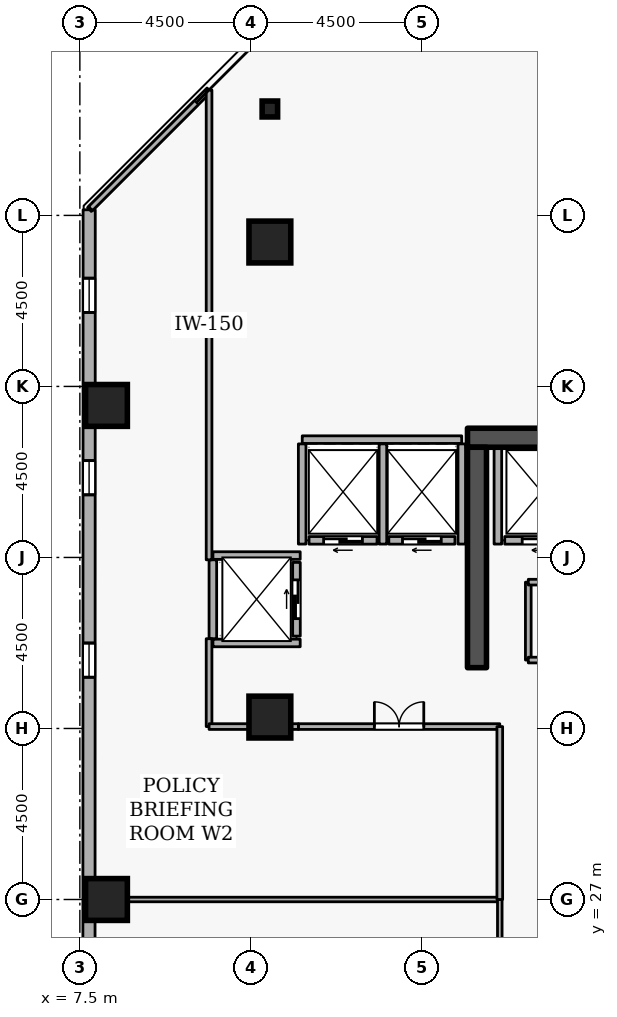
"""IFC4 building model, lengths in metres.
Left out: names, types, materials, properties, quantities, classifications, styles, units other than length and angle.
Written with IfcOpenShell. Run it as: python <this file> out.ifc"""

import sys

from ifc_helpers import new_model, si_unit, direction, frame, frame_2d, origin, origin_2d, place, context, subcontext, project, spatial, rectangle, i_section, extrude, element, fill, save


model = new_model("IFC4")
c1 = context("Model", 3, precision=1e-05, world=origin(), true_north=direction((0.0, 1.0)))
c2 = subcontext(c1, "Body", "Model", "MODEL_VIEW")
j1 = project(units=[si_unit("LENGTHUNIT", "METRE"), si_unit("PLANEANGLEUNIT", "RADIAN")], contexts=[c1])
p1 = place(None, origin())
s1 = spatial("IfcSite", under=j1, at=p1, CompositionType="ELEMENT")
p2 = place(p1, origin())
s2 = spatial("IfcBuilding", under=s1, at=p2, CompositionType="ELEMENT")
p3 = place(p2, frame((0.0, 0.0, 182.1)))
s3 = spatial("IfcBuildingStorey", under=s2, at=p3, CompositionType="ELEMENT", Elevation=182.1)
p4 = place(p3, frame((17.7, 39.15, 0.0), z_axis=(0.0, 0.0, 1.0), x_axis=(1.0, 0.0, 0.0)))
e1 = element("IfcWall", 1, at=p4, inside=s3, PredefinedType="SHEAR", context=c2, shape_type="SweptSolid", body=[
    extrude(rectangle(XDim=15.6, YDim=0.5, at=frame_2d((7.8, 0.0))), origin(), (0.0, 0.0, 1.0), 3.6),
])
p5 = place(p3, frame((17.95, 33.1, 0.0), z_axis=(0.0, 0.0, 1.0), x_axis=(0.0, 1.0, 0.0)))
e2 = element("IfcWall", 2, at=p5, inside=s3, PredefinedType="SHEAR", context=c2, shape_type="SweptSolid", body=[
    extrude(rectangle(XDim=5.8, YDim=0.5, at=frame_2d((2.9, 0.0))), origin(), (0.0, 0.0, 1.0), 3.6),
])
for number, where, z_axis, x_axis in (
    (3, (12.5, 44.3, 0.0), (0.0, 0.0, 1.0), (1.0, 0.0, 0.0)),
    (4, (8.2, 27.0, 0.0), (0.0, 0.0, 1.0), (1.0, 0.0, 0.0)),
    (5, (8.2, 40.0, 0.0), (0.0, 0.0, 1.0), (1.0, 0.0, 0.0)),
    (6, (12.5, 31.8, 0.0), (0.0, 0.0, 1.0), (1.0, 0.0, 0.0)),
):
    element("IfcColumn", number, at=place(p3, frame(where, z_axis=z_axis, x_axis=x_axis)), inside=s3, PredefinedType="COLUMN", context=c2, shape_type="SweptSolid", body=[
        extrude(rectangle(XDim=1.1, YDim=1.1, at=origin_2d()), origin(), (0.0, 0.0, 1.0), 3.6),
    ])
p6 = place(p3, frame((12.5, 47.8, 0.0), z_axis=(0.0, 0.0, 1.0), x_axis=(1.0, 0.0, 0.0)))
e7 = element("IfcColumn", 7, at=p6, inside=s3, PredefinedType="COLUMN", context=c2, shape_type="SweptSolid", body=[
    extrude(i_section(OverallWidth=0.407, OverallDepth=0.419, WebThickness=0.031, FlangeThickness=0.049, FilletRadius=0.015, at=origin_2d()), origin(), (0.0, 0.0, 1.0), 3.6),
])
p7 = place(p3, frame((7.745, 45.148, 0.0), z_axis=(0.0, 0.0, 1.0), x_axis=(-0.000300328883, -0.999999954901, 0.0)))
e8 = element("IfcWall", 8, at=p7, inside=s3, PredefinedType="STANDARD", context=c2, shape_type="SweptSolid", body=[
    extrude(rectangle(XDim=33.329, YDim=0.32, at=frame_2d((16.665, 0.0))), origin(), (0.0, 0.0, 1.0), 2.7),
])
p8 = place(p7, frame((1.8, 0.0, 0.72)))
e9 = element("IfcOpeningElement", 9, at=p8, cuts=e8, PredefinedType="OPENING", context=c2, shape_type="SweptSolid", body=[
    extrude(rectangle(XDim=0.9, YDim=1.75, at=frame_2d((0.45, 0.875))), frame((0.0, 0.17, 0.0), z_axis=(0.0, -1.0, 0.0), x_axis=(1.0, 0.0, 0.0)), (0.0, 0.0, 1.0), 0.34),
])
p9 = place(p7, frame((6.6, 0.0, 0.72)))
e10 = element("IfcOpeningElement", 10, at=p9, cuts=e8, PredefinedType="OPENING", context=c2, shape_type="SweptSolid", body=[
    extrude(rectangle(XDim=0.9, YDim=1.75, at=frame_2d((0.45, 0.875))), frame((0.0, 0.17, 0.0), z_axis=(0.0, -1.0, 0.0), x_axis=(1.0, 0.0, 0.0)), (0.0, 0.0, 1.0), 0.34),
])
p10 = place(p7, frame((11.4, 0.0, 0.72)))
e11 = element("IfcOpeningElement", 11, at=p10, cuts=e8, PredefinedType="OPENING", context=c2, shape_type="SweptSolid", body=[
    extrude(rectangle(XDim=0.9, YDim=1.75, at=frame_2d((0.45, 0.875))), frame((0.0, 0.17, 0.0), z_axis=(0.0, -1.0, 0.0), x_axis=(1.0, 0.0, 0.0)), (0.0, 0.0, 1.0), 0.34),
])
p11 = place(p7, frame((21.0, 0.0, 0.72)))
e12 = element("IfcOpeningElement", 12, at=p11, cuts=e8, PredefinedType="OPENING", context=c2, shape_type="SweptSolid", body=[
    extrude(rectangle(XDim=0.9, YDim=1.75, at=frame_2d((0.45, 0.875))), frame((0.0, 0.17, 0.0), z_axis=(0.0, -1.0, 0.0), x_axis=(1.0, 0.0, 0.0)), (0.0, 0.0, 1.0), 0.34),
])
p12 = place(p7, frame((25.8, 0.0, 0.72)))
e13 = element("IfcOpeningElement", 13, at=p12, cuts=e8, PredefinedType="OPENING", context=c2, shape_type="SweptSolid", body=[
    extrude(rectangle(XDim=0.9, YDim=1.75, at=frame_2d((0.45, 0.875))), frame((0.0, 0.17, 0.0), z_axis=(0.0, -1.0, 0.0), x_axis=(1.0, 0.0, 0.0)), (0.0, 0.0, 1.0), 0.34),
])
p13 = place(p3, frame((20.62, 36.45, 0.0), z_axis=(0.0, 0.0, 1.0), x_axis=(-1.0, 0.0, 0.0)))
e14 = element("IfcWall", 14, at=p13, inside=s3, PredefinedType="STANDARD", context=c2, shape_type="SweptSolid", body=[
    extrude(rectangle(XDim=1.94, YDim=0.2, at=frame_2d((0.97, 0.0))), origin(), (0.0, 0.0, 1.0), 3.34),
])
p14 = place(p13, frame((0.46, 0.0, 0.0)))
e15 = element("IfcOpeningElement", 15, at=p14, cuts=e14, PredefinedType="OPENING", context=c2, shape_type="SweptSolid", body=[
    extrude(rectangle(XDim=1.02, YDim=2.06, at=frame_2d((0.51, 1.03))), frame((0.0, 0.11, 0.0), z_axis=(0.0, -1.0, 0.0), x_axis=(1.0, 0.0, 0.0)), (0.0, 0.0, 1.0), 0.22),
])
p15 = place(p3, frame((17.37, 36.45, 0.0), z_axis=(0.0, 0.0, 1.0), x_axis=(-1.0, 0.0, 0.0)))
e16 = element("IfcWall", 16, at=p15, inside=s3, PredefinedType="STANDARD", context=c2, shape_type="SweptSolid", body=[
    extrude(rectangle(XDim=1.74, YDim=0.2, at=frame_2d((0.87, 0.0))), origin(), (0.0, 0.0, 1.0), 3.34),
])
p16 = place(p15, frame((0.36, 0.0, 0.0)))
e17 = element("IfcOpeningElement", 17, at=p16, cuts=e16, PredefinedType="OPENING", context=c2, shape_type="SweptSolid", body=[
    extrude(rectangle(XDim=1.02, YDim=2.06, at=frame_2d((0.51, 1.03))), frame((0.0, 0.11, 0.0), z_axis=(0.0, -1.0, 0.0), x_axis=(1.0, 0.0, 0.0)), (0.0, 0.0, 1.0), 0.22),
])
p17 = place(p3, frame((15.32, 36.45, 0.0), z_axis=(0.0, 0.0, 1.0), x_axis=(-1.0, 0.0, 0.0)))
e18 = element("IfcWall", 18, at=p17, inside=s3, PredefinedType="STANDARD", context=c2, shape_type="SweptSolid", body=[
    extrude(rectangle(XDim=1.79, YDim=0.2, at=frame_2d((0.895, 0.0))), origin(), (0.0, 0.0, 1.0), 3.34),
])
p18 = place(p17, frame((0.385, 0.0, 0.0)))
e19 = element("IfcOpeningElement", 19, at=p18, cuts=e18, PredefinedType="OPENING", context=c2, shape_type="SweptSolid", body=[
    extrude(rectangle(XDim=1.02, YDim=2.06, at=frame_2d((0.51, 1.03))), frame((0.0, 0.11, 0.0), z_axis=(0.0, -1.0, 0.0), x_axis=(1.0, 0.0, 0.0)), (0.0, 0.0, 1.0), 0.22),
])
p19 = place(p3, frame((13.2, 33.93, 0.0), z_axis=(0.0, 0.0, 1.0), x_axis=(0.0, 1.0, 0.0)))
e20 = element("IfcWall", 20, at=p19, inside=s3, PredefinedType="STANDARD", context=c2, shape_type="SweptSolid", body=[
    extrude(rectangle(XDim=1.94, YDim=0.2, at=frame_2d((0.97, 0.0))), origin(), (0.0, 0.0, 1.0), 3.34),
])
p20 = place(p19, frame((0.46, 0.0, 0.0)))
e21 = element("IfcOpeningElement", 21, at=p20, cuts=e20, PredefinedType="OPENING", context=c2, shape_type="SweptSolid", body=[
    extrude(rectangle(XDim=1.02, YDim=2.06, at=frame_2d((0.51, 1.03))), frame((0.0, 0.11, 0.0), z_axis=(0.0, -1.0, 0.0), x_axis=(1.0, 0.0, 0.0)), (0.0, 0.0, 1.0), 0.22),
])
p21 = place(p3, frame((18.5, 36.352, 0.0), z_axis=(0.0, 0.0, 1.0), x_axis=(0.0, 1.0, 0.0)))
e22 = element("IfcWall", 22, at=p21, inside=s3, PredefinedType="STANDARD", context=c2, shape_type="SweptSolid", body=[
    extrude(rectangle(XDim=2.536, YDim=0.2, at=frame_2d((1.268, 0.0))), origin(), (0.0, 0.0, 1.0), 3.34),
])
p22 = place(p3, frame((13.352, 39.1, 0.0), z_axis=(0.0, 0.0, 1.0), x_axis=(1.0, 0.0, 0.0)))
e23 = element("IfcWall", 23, at=p22, inside=s3, PredefinedType="STANDARD", context=c2, shape_type="SweptSolid", body=[
    extrude(rectangle(XDim=4.196, YDim=0.2, at=frame_2d((2.098, 0.0))), origin(), (0.0, 0.0, 1.0), 3.34),
])
p23 = place(p3, frame((17.55, 36.352, 0.0), z_axis=(0.0, 0.0, 1.0), x_axis=(0.0, 1.0, 0.0)))
e24 = element("IfcWall", 24, at=p23, inside=s3, PredefinedType="STANDARD", context=c2, shape_type="SweptSolid", body=[
    extrude(rectangle(XDim=2.636, YDim=0.2, at=frame_2d((1.318, 0.0))), origin(), (0.0, 0.0, 1.0), 2.545),
])
for number, where, z_axis, x_axis in (
    (25, (15.475, 36.352, 0.0), (0.0, 0.0, 1.0), (0.0, 1.0, 0.0)),
    (26, (13.35, 36.352, 0.0), (0.0, 0.0, 1.0), (0.0, 1.0, 0.0)),
):
    element("IfcWall", number, at=place(p3, frame(where, z_axis=z_axis, x_axis=x_axis)), inside=s3, PredefinedType="STANDARD", context=c2, shape_type="SweptSolid", body=[
        extrude(rectangle(XDim=2.636, YDim=0.2, at=frame_2d((1.318, 0.0))), origin(), (0.0, 0.0, 1.0), 3.34),
    ])
for number, where, z_axis, x_axis in (
    (27, (11.002, 36.05, 0.0), (0.0, 0.0, 1.0), (1.0, 0.0, 0.0)),
    (28, (11.002, 33.75, 0.0), (0.0, 0.0, 1.0), (1.0, 0.0, 0.0)),
):
    element("IfcWall", number, at=place(p3, frame(where, z_axis=z_axis, x_axis=x_axis)), inside=s3, PredefinedType="STANDARD", context=c2, shape_type="SweptSolid", body=[
        extrude(rectangle(XDim=2.296, YDim=0.2, at=frame_2d((1.148, 0.0))), origin(), (0.0, 0.0, 1.0), 3.34),
    ])
p24 = place(p3, frame((11.0, 33.862, 0.0), z_axis=(0.0, 0.0, 1.0), x_axis=(0.0, 1.0, 0.0)))
e29 = element("IfcWall", 29, at=p24, inside=s3, PredefinedType="STANDARD", context=c2, shape_type="SweptSolid", body=[
    extrude(rectangle(XDim=2.076, YDim=0.2, at=frame_2d((1.038, 0.0))), origin(), (0.0, 0.0, 1.0), 3.34),
])
p25 = place(p3, frame((19.3, 33.3, 0.0), z_axis=(0.0, 0.0, 1.0), x_axis=(0.0, 1.0, 0.0)))
e30 = element("IfcWall", 30, at=p25, inside=s3, PredefinedType="PARTITIONING", context=c2, shape_type="SweptSolid", body=[
    extrude(rectangle(XDim=2.05, YDim=0.15, at=frame_2d((1.025, 0.0))), origin(), (0.0, 0.0, 1.0), 3.34),
])
p26 = place(p3, frame((19.3, 35.35, 0.0), z_axis=(0.0, 0.0, 1.0), x_axis=(1.0, 0.0, 0.0)))
e31 = element("IfcWall", 31, at=p26, inside=s3, PredefinedType="PARTITIONING", context=c2, shape_type="SweptSolid", body=[
    extrude(rectangle(XDim=3.25, YDim=0.15, at=frame_2d((1.625, 0.0))), origin(), (0.0, 0.0, 1.0), 3.34),
])
p27 = place(p3, frame((22.55, 33.3, 0.0), z_axis=(0.0, 0.0, 1.0), x_axis=(-1.0, 0.0, 0.0)))
e32 = element("IfcWall", 32, at=p27, inside=s3, PredefinedType="PARTITIONING", context=c2, shape_type="SweptSolid", body=[
    extrude(rectangle(XDim=3.25, YDim=0.15, at=frame_2d((1.625, 0.0))), origin(), (0.0, 0.0, 1.0), 3.34),
])
p28 = place(p27, frame((1.165, 0.0, 0.0)))
e33 = element("IfcOpeningElement", 33, at=p28, cuts=e32, PredefinedType="OPENING", context=c2, shape_type="SweptSolid", body=[
    extrude(rectangle(XDim=0.92, YDim=2.08, at=frame_2d((0.46, 1.04))), frame((0.0, 0.085, 0.0), z_axis=(0.0, -1.0, 0.0), x_axis=(1.0, 0.0, 0.0)), (0.0, 0.0, 1.0), 0.17),
])
p29 = place(p3, frame((7.78, 27.0, 0.0), z_axis=(0.0, 0.0, 1.0), x_axis=(1.0, 0.0, 0.0)))
e34 = element("IfcWall", 34, at=p29, inside=s3, PredefinedType="PARTITIONING", context=c2, shape_type="SweptSolid", body=[
    extrude(rectangle(XDim=10.77, YDim=0.12, at=frame_2d((5.385, 0.0))), origin(), (0.0, 0.0, 1.0), 2.932),
])
p30 = place(p3, frame((18.55, 27.0, 0.0), z_axis=(0.0, 0.0, 1.0), x_axis=(0.0, -1.0, 0.0)))
e35 = element("IfcWall", 35, at=p30, inside=s3, PredefinedType="PARTITIONING", context=c2, shape_type="SweptSolid", body=[
    extrude(rectangle(XDim=4.55, YDim=0.12, at=frame_2d((2.275, 0.0))), origin(), (0.0, 0.0, 1.0), 3.34),
])
p31 = place(p3, frame((13.25, 31.55, 0.0), z_axis=(0.0, 0.0, 1.0), x_axis=(1.0, 0.0, 0.0)))
e36 = element("IfcWall", 36, at=p31, inside=s3, PredefinedType="PARTITIONING", context=c2, shape_type="SweptSolid", body=[
    extrude(rectangle(XDim=5.3, YDim=0.15, at=frame_2d((2.65, 0.0))), origin(), (0.0, 0.0, 1.0), 3.34),
])
p32 = place(p31, frame((2.0, 0.0, 0.0)))
e37 = element("IfcOpeningElement", 37, at=p32, cuts=e36, PredefinedType="OPENING", context=c2, shape_type="SweptSolid", body=[
    extrude(rectangle(XDim=1.3, YDim=2.12, at=frame_2d((0.65, 1.06))), frame((0.0, 0.085, 0.0), z_axis=(0.0, -1.0, 0.0), x_axis=(1.0, 0.0, 0.0)), (0.0, 0.0, 1.0), 0.17),
])
p33 = place(p3, frame((18.55, 31.55, 0.0), z_axis=(0.0, 0.0, 1.0), x_axis=(0.0, -1.0, 0.0)))
e38 = element("IfcWall", 38, at=p33, inside=s3, PredefinedType="PARTITIONING", context=c2, shape_type="SweptSolid", body=[
    extrude(rectangle(XDim=4.55, YDim=0.15, at=frame_2d((2.275, 0.0))), origin(), (0.0, 0.0, 1.0), 3.34),
])
p34 = place(p3, frame((7.78, 45.179, 0.0), z_axis=(0.0, 0.0, 1.0), x_axis=(0.707106781187, 0.707106781187, 0.0)))
e39 = element("IfcWall", 39, at=p34, inside=s3, PredefinedType="PARTITIONING", context=c2, shape_type="SweptSolid", body=[
    extrude(rectangle(XDim=4.412, YDim=0.15, at=frame_2d((2.206, 0.0))), origin(), (0.0, 0.0, 1.0), 3.34),
])
p35 = place(p3, frame((10.9, 48.299, 0.0), z_axis=(0.0, 0.0, 1.0), x_axis=(0.0, -1.0, 0.0)))
e40 = element("IfcWall", 40, at=p35, inside=s3, PredefinedType="PARTITIONING", context=c2, shape_type="SweptSolid", body=[
    extrude(rectangle(XDim=12.361, YDim=0.15, at=frame_2d((6.181, 0.0))), origin(), (0.0, 0.0, 1.0), 3.34),
])
p36 = place(p3, frame((10.9, 33.862, 0.0), z_axis=(0.0, 0.0, 1.0), x_axis=(0.0, -1.0, 0.0)))
e41 = element("IfcWall", 41, at=p36, inside=s3, PredefinedType="PARTITIONING", context=c2, shape_type="SweptSolid", body=[
    extrude(rectangle(XDim=2.312, YDim=0.15, at=frame_2d((1.156, 0.0))), origin(), (0.0, 0.0, 1.0), 3.34),
])
p37 = place(p3, frame((10.9, 31.55, 0.0), z_axis=(0.0, 0.0, 1.0), x_axis=(1.0, 0.0, 0.0)))
e42 = element("IfcWall", 42, at=p37, inside=s3, PredefinedType="PARTITIONING", context=c2, shape_type="SweptSolid", body=[
    extrude(rectangle(XDim=2.35, YDim=0.15, at=frame_2d((1.175, 0.0))), origin(), (0.0, 0.0, 1.0), 3.34),
])
p38 = place(p8, origin())
e43 = element("IfcWindow", 43, at=p38, inside=s3, PartitioningType="SINGLE_PANEL", PredefinedType="WINDOW", context=c2, shape_type="SweptSolid", body=[
    extrude(rectangle(XDim=0.9, YDim=1.75, at=frame_2d((0.45, 0.875))), frame((0.0, 0.03, 0.0), z_axis=(0.0, -1.0, 0.0), x_axis=(1.0, 0.0, 0.0)), (0.0, 0.0, 1.0), 0.06),
])
fill(e9, e43)
p39 = place(p9, origin())
e44 = element("IfcWindow", 44, at=p39, inside=s3, PartitioningType="SINGLE_PANEL", PredefinedType="WINDOW", context=c2, shape_type="SweptSolid", body=[
    extrude(rectangle(XDim=0.9, YDim=1.75, at=frame_2d((0.45, 0.875))), frame((0.0, 0.03, 0.0), z_axis=(0.0, -1.0, 0.0), x_axis=(1.0, 0.0, 0.0)), (0.0, 0.0, 1.0), 0.06),
])
fill(e10, e44)
p40 = place(p10, origin())
e45 = element("IfcWindow", 45, at=p40, inside=s3, PartitioningType="SINGLE_PANEL", PredefinedType="WINDOW", context=c2, shape_type="SweptSolid", body=[
    extrude(rectangle(XDim=0.9, YDim=1.75, at=frame_2d((0.45, 0.875))), frame((0.0, 0.03, 0.0), z_axis=(0.0, -1.0, 0.0), x_axis=(1.0, 0.0, 0.0)), (0.0, 0.0, 1.0), 0.06),
])
fill(e11, e45)
p41 = place(p14, origin())
e46 = element("IfcDoor", 46, at=p41, inside=s3, OperationType="SLIDING_TO_LEFT", PredefinedType="DOOR", context=c2, shape_type="SweptSolid", body=[
    extrude(rectangle(XDim=1.02, YDim=2.06, at=frame_2d((0.51, 1.03))), frame((0.0, 0.025, 0.0), z_axis=(0.0, -1.0, 0.0), x_axis=(1.0, 0.0, 0.0)), (0.0, 0.0, 1.0), 0.05),
])
fill(e15, e46)
p42 = place(p16, origin())
e47 = element("IfcDoor", 47, at=p42, inside=s3, OperationType="SLIDING_TO_LEFT", PredefinedType="DOOR", context=c2, shape_type="SweptSolid", body=[
    extrude(rectangle(XDim=1.02, YDim=2.06, at=frame_2d((0.51, 1.03))), frame((0.0, 0.025, 0.0), z_axis=(0.0, -1.0, 0.0), x_axis=(1.0, 0.0, 0.0)), (0.0, 0.0, 1.0), 0.05),
])
fill(e17, e47)
p43 = place(p18, origin())
e48 = element("IfcDoor", 48, at=p43, inside=s3, OperationType="SLIDING_TO_LEFT", PredefinedType="DOOR", context=c2, shape_type="SweptSolid", body=[
    extrude(rectangle(XDim=1.02, YDim=2.06, at=frame_2d((0.51, 1.03))), frame((0.0, 0.025, 0.0), z_axis=(0.0, -1.0, 0.0), x_axis=(1.0, 0.0, 0.0)), (0.0, 0.0, 1.0), 0.05),
])
fill(e19, e48)
p44 = place(p20, origin())
e49 = element("IfcDoor", 49, at=p44, inside=s3, OperationType="SLIDING_TO_LEFT", PredefinedType="DOOR", context=c2, shape_type="SweptSolid", body=[
    extrude(rectangle(XDim=1.02, YDim=2.06, at=frame_2d((0.51, 1.03))), frame((0.0, 0.025, 0.0), z_axis=(0.0, -1.0, 0.0), x_axis=(1.0, 0.0, 0.0)), (0.0, 0.0, 1.0), 0.05),
])
fill(e21, e49)
p45 = place(p32, origin())
e50 = element("IfcDoor", 50, at=p45, inside=s3, OperationType="DOUBLE_DOOR_SINGLE_SWING", PredefinedType="DOOR", context=c2, shape_type="SweptSolid", body=[
    extrude(rectangle(XDim=1.3, YDim=2.12, at=frame_2d((0.65, 1.06))), frame((0.0, 0.025, 0.0), z_axis=(0.0, -1.0, 0.0), x_axis=(1.0, 0.0, 0.0)), (0.0, 0.0, 1.0), 0.05),
])
fill(e37, e50)
save(model, sys.argv[1])
